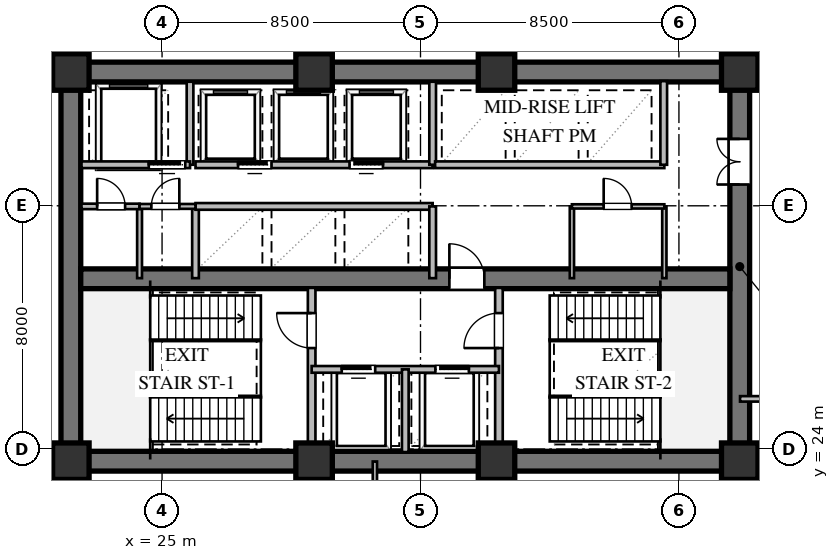
"""IFC4 building model, lengths in metres.
Left out: names, types, materials, properties, quantities, classifications, styles, units other than length and angle.
Written with IfcOpenShell. Run it as: python <this file> out.ifc"""

import sys

from ifc_helpers import new_model, si_unit, direction, frame, frame_2d, origin, origin_2d, place, context, subcontext, project, spatial, rectangle, extrude, element, fill, save


model = new_model("IFC4")
c1 = context("Model", 3, precision=1e-05, world=origin(), true_north=direction((0.0, 1.0)))
c2 = subcontext(c1, "Body", "Model", "MODEL_VIEW")
j1 = project(units=[si_unit("LENGTHUNIT", "METRE"), si_unit("PLANEANGLEUNIT", "RADIAN")], contexts=[c1])
p1 = place(None, origin())
s1 = spatial("IfcSite", under=j1, at=p1, CompositionType="ELEMENT")
p2 = place(p1, origin())
s2 = spatial("IfcBuilding", under=s1, at=p2, CompositionType="ELEMENT")
p3 = place(p2, frame((0.0, 0.0, 9.6)))
s3 = spatial("IfcBuildingStorey", under=s2, at=p3, CompositionType="ELEMENT", Elevation=9.6)
for number, where, z_axis, x_axis in (
    (1, (21.675, 23.6, 0.0), (0.0, 0.0, 1.0), (1.0, 0.0, 0.0)),
    (2, (21.675, 36.4, 0.0), (0.0, 0.0, 1.0), (1.0, 0.0, 0.0)),
):
    element("IfcWall", number, at=place(p3, frame(where, z_axis=z_axis, x_axis=x_axis)), inside=s3, PredefinedType="SHEAR", context=c2, shape_type="SweptSolid", body=[
        extrude(rectangle(XDim=22.65, YDim=0.65, at=frame_2d((11.325, 0.0))), origin(), (0.0, 0.0, 1.0), 4.52),
    ])
p4 = place(p3, frame((22.0, 23.925, 0.0), z_axis=(0.0, 0.0, 1.0), x_axis=(0.0, 1.0, 0.0)))
e3 = element("IfcWall", 3, at=p4, inside=s3, PredefinedType="SHEAR", context=c2, shape_type="SweptSolid", body=[
    extrude(rectangle(XDim=12.15, YDim=0.65, at=frame_2d((6.075, 0.0))), origin(), (0.0, 0.0, 1.0), 4.52),
])
p5 = place(p3, frame((44.0, 23.925, 0.0), z_axis=(0.0, 0.0, 1.0), x_axis=(0.0, 1.0, 0.0)))
e4 = element("IfcWall", 4, at=p5, inside=s3, PredefinedType="SHEAR", context=c2, shape_type="SweptSolid", body=[
    extrude(rectangle(XDim=12.15, YDim=0.65, at=frame_2d((6.075, 0.0))), origin(), (0.0, 0.0, 1.0), 4.52),
])
p6 = place(p5, frame((8.775, 0.0, 0.0)))
e5 = element("IfcOpeningElement", 5, at=p6, cuts=e4, PredefinedType="OPENING", context=c2, shape_type="SweptSolid", body=[
    extrude(rectangle(XDim=1.5, YDim=2.15, at=frame_2d((0.75, 1.075))), frame((0.0, 0.335, 0.0), z_axis=(0.0, -1.0, 0.0), x_axis=(1.0, 0.0, 0.0)), (0.0, 0.0, 1.0), 0.67),
])
p7 = place(p3, frame((22.325, 29.6, 0.0), z_axis=(0.0, 0.0, 1.0), x_axis=(1.0, 0.0, 0.0)))
e6 = element("IfcWall", 6, at=p7, inside=s3, PredefinedType="SHEAR", context=c2, shape_type="SweptSolid", body=[
    extrude(rectangle(XDim=21.35, YDim=0.65, at=frame_2d((10.675, 0.0))), origin(), (0.0, 0.0, 1.0), 4.52),
])
p8 = place(p7, frame((12.125, 0.0, 0.0)))
e7 = element("IfcOpeningElement", 7, at=p8, cuts=e6, PredefinedType="OPENING", context=c2, shape_type="SweptSolid", body=[
    extrude(rectangle(XDim=1.15, YDim=2.1, at=frame_2d((0.575, 1.05))), frame((0.0, 0.335, 0.0), z_axis=(0.0, -1.0, 0.0), x_axis=(1.0, 0.0, 0.0)), (0.0, 0.0, 1.0), 0.67),
])
for number, where, z_axis, x_axis in (
    (8, (22.0, 23.6, 0.0), (0.0, 0.0, 1.0), (1.0, 0.0, 0.0)),
    (9, (30.0, 23.6, 0.0), (0.0, 0.0, 1.0), (1.0, 0.0, 0.0)),
    (10, (36.0, 23.6, 0.0), (0.0, 0.0, 1.0), (1.0, 0.0, 0.0)),
    (11, (44.0, 23.6, 0.0), (0.0, 0.0, 1.0), (1.0, 0.0, 0.0)),
    (12, (44.0, 36.4, 0.0), (0.0, 0.0, 1.0), (1.0, 0.0, 0.0)),
    (13, (36.0, 36.4, 0.0), (0.0, 0.0, 1.0), (1.0, 0.0, 0.0)),
    (14, (30.0, 36.4, 0.0), (0.0, 0.0, 1.0), (1.0, 0.0, 0.0)),
    (15, (22.0, 36.4, 0.0), (0.0, 0.0, 1.0), (1.0, 0.0, 0.0)),
):
    element("IfcColumn", number, at=place(p3, frame(where, z_axis=z_axis, x_axis=x_axis)), inside=s3, PredefinedType="COLUMN", context=c2, shape_type="SweptSolid", body=[
        extrude(rectangle(XDim=1.2, YDim=1.2, at=origin_2d()), origin(), (0.0, 0.0, 1.0), 4.8),
    ])
p9 = place(p3, frame((29.92, 23.9, 0.0), z_axis=(0.0, 0.0, 1.0), x_axis=(0.0, 1.0, 0.0)))
e16 = element("IfcWall", 16, at=p9, inside=s3, PredefinedType="SOLIDWALL", context=c2, shape_type="SweptSolid", body=[
    extrude(rectangle(XDim=5.4, YDim=0.25, at=frame_2d((2.7, 0.0))), origin(), (0.0, 0.0, 1.0), 4.52),
])
p10 = place(p9, frame((3.421, 0.0, 0.0)))
e17 = element("IfcOpeningElement", 17, at=p10, cuts=e16, PredefinedType="OPENING", context=c2, shape_type="SweptSolid", body=[
    extrude(rectangle(XDim=1.15, YDim=2.1, at=frame_2d((0.575, 1.05))), frame((0.0, 0.135, 0.0), z_axis=(0.0, -1.0, 0.0), x_axis=(1.0, 0.0, 0.0)), (0.0, 0.0, 1.0), 0.27),
])
p11 = place(p3, frame((36.08, 23.9, 0.0), z_axis=(0.0, 0.0, 1.0), x_axis=(0.0, 1.0, 0.0)))
e18 = element("IfcWall", 18, at=p11, inside=s3, PredefinedType="SOLIDWALL", context=c2, shape_type="SweptSolid", body=[
    extrude(rectangle(XDim=5.4, YDim=0.25, at=frame_2d((2.7, 0.0))), origin(), (0.0, 0.0, 1.0), 4.52),
])
p12 = place(p11, frame((3.421, 0.0, 0.0)))
e19 = element("IfcOpeningElement", 19, at=p12, cuts=e18, PredefinedType="OPENING", context=c2, shape_type="SweptSolid", body=[
    extrude(rectangle(XDim=1.15, YDim=2.1, at=frame_2d((0.575, 1.05))), frame((0.0, 0.135, 0.0), z_axis=(0.0, -1.0, 0.0), x_axis=(1.0, 0.0, 0.0)), (0.0, 0.0, 1.0), 0.27),
])
p13 = place(p3, frame((29.92, 26.62, 0.0), z_axis=(0.0, 0.0, 1.0), x_axis=(1.0, 0.0, 0.0)))
e20 = element("IfcWall", 20, at=p13, inside=s3, PredefinedType="SOLIDWALL", context=c2, shape_type="SweptSolid", body=[
    extrude(rectangle(XDim=6.16, YDim=0.22, at=frame_2d((3.08, 0.0))), origin(), (0.0, 0.0, 1.0), 4.52),
])
p14 = place(p13, frame((0.99, 0.0, 0.0)))
e21 = element("IfcOpeningElement", 21, at=p14, cuts=e20, PredefinedType="OPENING", context=c2, shape_type="SweptSolid", body=[
    extrude(rectangle(XDim=1.1, YDim=2.1, at=frame_2d((0.55, 1.05))), frame((0.0, 0.12, 0.0), z_axis=(0.0, -1.0, 0.0), x_axis=(1.0, 0.0, 0.0)), (0.0, 0.0, 1.0), 0.24),
])
p15 = place(p13, frame((4.07, 0.0, 0.0)))
e22 = element("IfcOpeningElement", 22, at=p15, cuts=e20, PredefinedType="OPENING", context=c2, shape_type="SweptSolid", body=[
    extrude(rectangle(XDim=1.1, YDim=2.1, at=frame_2d((0.55, 1.05))), frame((0.0, 0.12, 0.0), z_axis=(0.0, -1.0, 0.0), x_axis=(1.0, 0.0, 0.0)), (0.0, 0.0, 1.0), 0.24),
])
p16 = place(p3, frame((33.0, 23.9, 0.0), z_axis=(0.0, 0.0, 1.0), x_axis=(0.0, 1.0, 0.0)))
e23 = element("IfcWall", 23, at=p16, inside=s3, PredefinedType="SOLIDWALL", context=c2, shape_type="SweptSolid", body=[
    extrude(rectangle(XDim=2.72, YDim=0.22, at=frame_2d((1.36, 0.0))), origin(), (0.0, 0.0, 1.0), 4.52),
])
p17 = place(p3, frame((25.92, 33.35, 0.0), z_axis=(0.0, 0.0, 1.0), x_axis=(0.0, 1.0, 0.0)))
e24 = element("IfcWall", 24, at=p17, inside=s3, PredefinedType="SOLIDWALL", context=c2, shape_type="SweptSolid", body=[
    extrude(rectangle(XDim=2.73, YDim=0.22, at=frame_2d((1.365, 0.0))), origin(), (0.0, 0.0, 1.0), 4.52),
])
p18 = place(p3, frame((22.35, 33.35, 0.0), z_axis=(0.0, 0.0, 1.0), x_axis=(1.0, 0.0, 0.0)))
e25 = element("IfcWall", 25, at=p18, inside=s3, PredefinedType="SOLIDWALL", context=c2, shape_type="SweptSolid", body=[
    extrude(rectangle(XDim=3.57, YDim=0.22, at=frame_2d((1.785, 0.0))), origin(), (0.0, 0.0, 1.0), 4.52),
])
p19 = place(p18, frame((2.213, 0.0, 0.0)))
e26 = element("IfcOpeningElement", 26, at=p19, cuts=e25, PredefinedType="OPENING", context=c2, shape_type="SweptSolid", body=[
    extrude(rectangle(XDim=1.2, YDim=2.1, at=frame_2d((0.6, 1.05))), frame((0.0, 0.12, 0.0), z_axis=(0.0, -1.0, 0.0), x_axis=(1.0, 0.0, 0.0)), (0.0, 0.0, 1.0), 0.24),
])
p20 = place(p3, frame((26.1, 29.62, 0.0), z_axis=(0.0, 0.0, 1.0), x_axis=(0.0, 1.0, 0.0)))
e27 = element("IfcWall", 27, at=p20, inside=s3, PredefinedType="SOLIDWALL", context=c2, shape_type="SweptSolid", body=[
    extrude(rectangle(XDim=2.36, YDim=0.22, at=frame_2d((1.18, 0.0))), origin(), (0.0, 0.0, 1.0), 4.52),
])
p21 = place(p3, frame((26.1, 31.98, 0.0), z_axis=(0.0, 0.0, 1.0), x_axis=(1.0, 0.0, 0.0)))
e28 = element("IfcWall", 28, at=p21, inside=s3, PredefinedType="SOLIDWALL", context=c2, shape_type="SweptSolid", body=[
    extrude(rectangle(XDim=7.8, YDim=0.22, at=frame_2d((3.9, 0.0))), origin(), (0.0, 0.0, 1.0), 4.52),
])
p22 = place(p3, frame((33.9, 29.62, 0.0), z_axis=(0.0, 0.0, 1.0), x_axis=(0.0, 1.0, 0.0)))
e29 = element("IfcWall", 29, at=p22, inside=s3, PredefinedType="SOLIDWALL", context=c2, shape_type="SweptSolid", body=[
    extrude(rectangle(XDim=2.36, YDim=0.22, at=frame_2d((1.18, 0.0))), origin(), (0.0, 0.0, 1.0), 4.52),
])
p23 = place(p3, frame((26.1, 33.35, 0.0), z_axis=(0.0, 0.0, 1.0), x_axis=(1.0, 0.0, 0.0)))
e30 = element("IfcWall", 30, at=p23, inside=s3, PredefinedType="SOLIDWALL", context=c2, shape_type="SweptSolid", body=[
    extrude(rectangle(XDim=7.8, YDim=0.22, at=frame_2d((3.9, 0.0))), origin(), (0.0, 0.0, 1.0), 4.52),
])
p24 = place(p23, frame((1.4, 0.0, 0.0)))
e31 = element("IfcOpeningElement", 31, at=p24, cuts=e30, PredefinedType="OPENING", context=c2, shape_type="SweptSolid", body=[
    extrude(rectangle(XDim=1.1, YDim=2.1, at=frame_2d((0.55, 1.05))), frame((0.0, 0.12, 0.0), z_axis=(0.0, -1.0, 0.0), x_axis=(1.0, 0.0, 0.0)), (0.0, 0.0, 1.0), 0.24),
])
p25 = place(p23, frame((5.066, 0.0, 0.0)))
e32 = element("IfcOpeningElement", 32, at=p25, cuts=e30, PredefinedType="OPENING", context=c2, shape_type="SweptSolid", body=[
    extrude(rectangle(XDim=1.1, YDim=2.1, at=frame_2d((0.55, 1.05))), frame((0.0, 0.12, 0.0), z_axis=(0.0, -1.0, 0.0), x_axis=(1.0, 0.0, 0.0)), (0.0, 0.0, 1.0), 0.24),
])
p26 = place(p3, frame((33.9, 33.35, 0.0), z_axis=(0.0, 0.0, 1.0), x_axis=(0.0, 1.0, 0.0)))
e33 = element("IfcWall", 33, at=p26, inside=s3, PredefinedType="SOLIDWALL", context=c2, shape_type="SweptSolid", body=[
    extrude(rectangle(XDim=2.73, YDim=0.22, at=frame_2d((1.365, 0.0))), origin(), (0.0, 0.0, 1.0), 4.52),
])
p27 = place(p3, frame((33.98, 33.35, 0.0), z_axis=(0.0, 0.0, 1.0), x_axis=(1.0, 0.0, 0.0)))
e34 = element("IfcWall", 34, at=p27, inside=s3, PredefinedType="SOLIDWALL", context=c2, shape_type="SweptSolid", body=[
    extrude(rectangle(XDim=7.54, YDim=0.22, at=frame_2d((3.77, 0.0))), origin(), (0.0, 0.0, 1.0), 4.52),
])
p28 = place(p3, frame((41.5, 33.35, 0.0), z_axis=(0.0, 0.0, 1.0), x_axis=(0.0, 1.0, 0.0)))
e35 = element("IfcWall", 35, at=p28, inside=s3, PredefinedType="SOLIDWALL", context=c2, shape_type="SweptSolid", body=[
    extrude(rectangle(XDim=2.75, YDim=0.22, at=frame_2d((1.375, 0.0))), origin(), (0.0, 0.0, 1.0), 4.52),
])
p29 = place(p3, frame((24.26, 29.62, 0.0), z_axis=(0.0, 0.0, 1.0), x_axis=(0.0, 1.0, 0.0)))
e36 = element("IfcWall", 36, at=p29, inside=s3, PredefinedType="PLUMBINGWALL", context=c2, shape_type="SweptSolid", body=[
    extrude(rectangle(XDim=2.36, YDim=0.16, at=frame_2d((1.18, 0.0))), origin(), (0.0, 0.0, 1.0), 1.887),
])
p30 = place(p3, frame((22.35, 31.98, 0.0), z_axis=(0.0, 0.0, 1.0), x_axis=(1.0, 0.0, 0.0)))
e37 = element("IfcWall", 37, at=p30, inside=s3, PredefinedType="PARTITIONING", context=c2, shape_type="SweptSolid", body=[
    extrude(rectangle(XDim=1.91, YDim=0.18, at=frame_2d((0.955, 0.0))), origin(), (0.0, 0.0, 1.0), 4.52),
])
p31 = place(p30, frame((0.515, 0.0, 0.0)))
e38 = element("IfcOpeningElement", 38, at=p31, cuts=e37, PredefinedType="OPENING", context=c2, shape_type="SweptSolid", body=[
    extrude(rectangle(XDim=0.92, YDim=2.1, at=frame_2d((0.46, 1.05))), frame((0.0, 0.1, 0.0), z_axis=(0.0, -1.0, 0.0), x_axis=(1.0, 0.0, 0.0)), (0.0, 0.0, 1.0), 0.2),
])
p32 = place(p3, frame((24.26, 31.98, 0.0), z_axis=(0.0, 0.0, 1.0), x_axis=(1.0, 0.0, 0.0)))
e39 = element("IfcWall", 39, at=p32, inside=s3, PredefinedType="PLUMBINGWALL", context=c2, shape_type="SweptSolid", body=[
    extrude(rectangle(XDim=1.84, YDim=0.16, at=frame_2d((0.92, 0.0))), origin(), (0.0, 0.0, 1.0), 4.52),
])
p33 = place(p32, frame((0.388, 0.0, 0.0)))
e40 = element("IfcOpeningElement", 40, at=p33, cuts=e39, PredefinedType="OPENING", context=c2, shape_type="SweptSolid", body=[
    extrude(rectangle(XDim=0.92, YDim=2.1, at=frame_2d((0.46, 1.05))), frame((0.0, 0.09, 0.0), z_axis=(0.0, -1.0, 0.0), x_axis=(1.0, 0.0, 0.0)), (0.0, 0.0, 1.0), 0.18),
])
p34 = place(p3, frame((38.48, 29.62, 0.0), z_axis=(0.0, 0.0, 1.0), x_axis=(0.0, 1.0, 0.0)))
e41 = element("IfcWall", 41, at=p34, inside=s3, PredefinedType="PARTITIONING", context=c2, shape_type="SweptSolid", body=[
    extrude(rectangle(XDim=2.36, YDim=0.14, at=frame_2d((1.18, 0.0))), origin(), (0.0, 0.0, 1.0), 4.52),
])
p35 = place(p3, frame((41.52, 29.62, 0.0), z_axis=(0.0, 0.0, 1.0), x_axis=(0.0, 1.0, 0.0)))
e42 = element("IfcWall", 42, at=p35, inside=s3, PredefinedType="PARTITIONING", context=c2, shape_type="SweptSolid", body=[
    extrude(rectangle(XDim=2.36, YDim=0.14, at=frame_2d((1.18, 0.0))), origin(), (0.0, 0.0, 1.0), 1.887),
])
p36 = place(p3, frame((38.48, 31.98, 0.0), z_axis=(0.0, 0.0, 1.0), x_axis=(1.0, 0.0, 0.0)))
e43 = element("IfcWall", 43, at=p36, inside=s3, PredefinedType="PARTITIONING", context=c2, shape_type="SweptSolid", body=[
    extrude(rectangle(XDim=3.04, YDim=0.14, at=frame_2d((1.52, 0.0))), origin(), (0.0, 0.0, 1.0), 4.52),
])
p37 = place(p36, frame((1.045, 0.0, 0.0)))
e44 = element("IfcOpeningElement", 44, at=p37, cuts=e43, PredefinedType="OPENING", context=c2, shape_type="SweptSolid", body=[
    extrude(rectangle(XDim=0.92, YDim=2.1, at=frame_2d((0.46, 1.05))), frame((0.0, 0.08, 0.0), z_axis=(0.0, -1.0, 0.0), x_axis=(1.0, 0.0, 0.0)), (0.0, 0.0, 1.0), 0.16),
])
p38 = place(p3, frame((62.415, 25.65, 0.0), z_axis=(0.0, 0.0, 1.0), x_axis=(-1.0, 0.0, 0.0)))
e45 = element("IfcWall", 45, at=p38, inside=s3, PredefinedType="PARTITIONING", context=c2, shape_type="SweptSolid", body=[
    extrude(rectangle(XDim=18.405, YDim=0.18, at=frame_2d((9.203, 0.0))), origin(), (0.0, 0.0, 1.0), 3.966),
])
p39 = place(p38, frame((8.46, 0.0, 0.0)))
e46 = element("IfcOpeningElement", 46, at=p39, cuts=e45, PredefinedType="OPENING", context=c2, shape_type="SweptSolid", body=[
    extrude(rectangle(XDim=1.2, YDim=2.15, at=frame_2d((0.6, 1.075))), frame((0.0, 0.1, 0.0), z_axis=(0.0, -1.0, 0.0), x_axis=(1.0, 0.0, 0.0)), (0.0, 0.0, 1.0), 0.2),
])
p40 = place(p3, frame((21.675, 23.59, 0.0), z_axis=(0.0, 0.0, 1.0), x_axis=(0.0, -1.0, 0.0)))
e47 = element("IfcWall", 47, at=p40, inside=s3, PredefinedType="PARTITIONING", context=c2, shape_type="SweptSolid", body=[
    extrude(rectangle(XDim=3.62, YDim=0.18, at=frame_2d((1.81, 0.0))), origin(), (0.0, 0.0, 1.0), 3.66),
])
p41 = place(p3, frame((44.325, 5.272, 0.0), z_axis=(0.0, 0.0, 1.0), x_axis=(0.0, 1.0, 0.0)))
e48 = element("IfcWall", 48, at=p41, inside=s3, PredefinedType="PARTITIONING", context=c2, shape_type="SweptSolid", body=[
    extrude(rectangle(XDim=18.318, YDim=0.14, at=frame_2d((9.159, 0.0))), origin(), (0.0, 0.0, 1.0), 3.66),
])
p42 = place(p41, frame((8.349, 0.0, 0.0)))
e49 = element("IfcOpeningElement", 49, at=p42, cuts=e48, PredefinedType="OPENING", context=c2, shape_type="SweptSolid", body=[
    extrude(rectangle(XDim=1.2, YDim=2.15, at=frame_2d((0.6, 1.075))), frame((0.0, 0.08, 0.0), z_axis=(0.0, -1.0, 0.0), x_axis=(1.0, 0.0, 0.0)), (0.0, 0.0, 1.0), 0.16),
])
p43 = place(p3, frame((32.0, 23.59, 0.0), z_axis=(0.0, 0.0, 1.0), x_axis=(0.0, -1.0, 0.0)))
e50 = element("IfcWall", 50, at=p43, inside=s3, PredefinedType="PARTITIONING", context=c2, shape_type="SweptSolid", body=[
    extrude(rectangle(XDim=16.944, YDim=0.14, at=frame_2d((8.472, 0.0))), origin(), (0.0, 0.0, 1.0), 4.52),
])
p44 = place(p10, origin())
e51 = element("IfcDoor", 51, at=p44, inside=s3, OperationType="SINGLE_SWING_RIGHT", PredefinedType="DOOR", context=c2, shape_type="SweptSolid", body=[
    extrude(rectangle(XDim=1.15, YDim=2.1, at=frame_2d((0.575, 1.05))), frame((0.0, 0.025, 0.0), z_axis=(0.0, -1.0, 0.0), x_axis=(1.0, 0.0, 0.0)), (0.0, 0.0, 1.0), 0.05),
])
fill(e17, e51)
p45 = place(p12, origin())
e52 = element("IfcDoor", 52, at=p45, inside=s3, OperationType="SINGLE_SWING_LEFT", PredefinedType="DOOR", context=c2, shape_type="SweptSolid", body=[
    extrude(rectangle(XDim=1.15, YDim=2.1, at=frame_2d((0.575, 1.05))), frame((0.0, 0.025, 0.0), z_axis=(0.0, -1.0, 0.0), x_axis=(1.0, 0.0, 0.0)), (0.0, 0.0, 1.0), 0.05),
])
fill(e19, e52)
p46 = place(p14, origin())
e53 = element("IfcDoor", 53, at=p46, inside=s3, OperationType="SLIDING_TO_LEFT", PredefinedType="DOOR", context=c2, shape_type="SweptSolid", body=[
    extrude(rectangle(XDim=1.1, YDim=2.1, at=frame_2d((0.55, 1.05))), frame((0.0, 0.025, 0.0), z_axis=(0.0, -1.0, 0.0), x_axis=(1.0, 0.0, 0.0)), (0.0, 0.0, 1.0), 0.05),
])
fill(e21, e53)
p47 = place(p15, origin())
e54 = element("IfcDoor", 54, at=p47, inside=s3, OperationType="SLIDING_TO_RIGHT", PredefinedType="DOOR", context=c2, shape_type="SweptSolid", body=[
    extrude(rectangle(XDim=1.1, YDim=2.1, at=frame_2d((0.55, 1.05))), frame((0.0, 0.025, 0.0), z_axis=(0.0, -1.0, 0.0), x_axis=(1.0, 0.0, 0.0)), (0.0, 0.0, 1.0), 0.05),
])
fill(e22, e54)
p48 = place(p8, origin())
e55 = element("IfcDoor", 55, at=p48, inside=s3, OperationType="SINGLE_SWING_LEFT", PredefinedType="DOOR", context=c2, shape_type="SweptSolid", body=[
    extrude(rectangle(XDim=1.15, YDim=2.1, at=frame_2d((0.575, 1.05))), frame((0.0, 0.025, 0.0), z_axis=(0.0, -1.0, 0.0), x_axis=(1.0, 0.0, 0.0)), (0.0, 0.0, 1.0), 0.05),
])
fill(e7, e55)
p49 = place(p6, origin())
e56 = element("IfcDoor", 56, at=p49, inside=s3, OperationType="DOUBLE_DOOR_SINGLE_SWING", PredefinedType="DOOR", context=c2, shape_type="SweptSolid", body=[
    extrude(rectangle(XDim=1.5, YDim=2.15, at=frame_2d((0.75, 1.075))), frame((0.0, 0.025, 0.0), z_axis=(0.0, -1.0, 0.0), x_axis=(1.0, 0.0, 0.0)), (0.0, 0.0, 1.0), 0.05),
])
fill(e5, e56)
p50 = place(p19, origin())
e57 = element("IfcDoor", 57, at=p50, inside=s3, OperationType="SLIDING_TO_LEFT", PredefinedType="DOOR", context=c2, shape_type="SweptSolid", body=[
    extrude(rectangle(XDim=1.2, YDim=2.1, at=frame_2d((0.6, 1.05))), frame((0.0, 0.025, 0.0), z_axis=(0.0, -1.0, 0.0), x_axis=(1.0, 0.0, 0.0)), (0.0, 0.0, 1.0), 0.05),
])
fill(e26, e57)
p51 = place(p24, origin())
e58 = element("IfcDoor", 58, at=p51, inside=s3, OperationType="SLIDING_TO_LEFT", PredefinedType="DOOR", context=c2, shape_type="SweptSolid", body=[
    extrude(rectangle(XDim=1.1, YDim=2.1, at=frame_2d((0.55, 1.05))), frame((0.0, 0.025, 0.0), z_axis=(0.0, -1.0, 0.0), x_axis=(1.0, 0.0, 0.0)), (0.0, 0.0, 1.0), 0.05),
])
fill(e31, e58)
p52 = place(p25, origin())
e59 = element("IfcDoor", 59, at=p52, inside=s3, OperationType="SLIDING_TO_RIGHT", PredefinedType="DOOR", context=c2, shape_type="SweptSolid", body=[
    extrude(rectangle(XDim=1.1, YDim=2.1, at=frame_2d((0.55, 1.05))), frame((0.0, 0.025, 0.0), z_axis=(0.0, -1.0, 0.0), x_axis=(1.0, 0.0, 0.0)), (0.0, 0.0, 1.0), 0.05),
])
fill(e32, e59)
p53 = place(p31, origin())
e60 = element("IfcDoor", 60, at=p53, inside=s3, OperationType="SINGLE_SWING_LEFT", PredefinedType="DOOR", context=c2, shape_type="SweptSolid", body=[
    extrude(rectangle(XDim=0.92, YDim=2.1, at=frame_2d((0.46, 1.05))), frame((0.0, 0.025, 0.0), z_axis=(0.0, -1.0, 0.0), x_axis=(1.0, 0.0, 0.0)), (0.0, 0.0, 1.0), 0.05),
])
fill(e38, e60)
p54 = place(p33, origin())
e61 = element("IfcDoor", 61, at=p54, inside=s3, OperationType="SINGLE_SWING_RIGHT", PredefinedType="DOOR", context=c2, shape_type="SweptSolid", body=[
    extrude(rectangle(XDim=0.92, YDim=2.1, at=frame_2d((0.46, 1.05))), frame((0.0, 0.025, 0.0), z_axis=(0.0, -1.0, 0.0), x_axis=(1.0, 0.0, 0.0)), (0.0, 0.0, 1.0), 0.05),
])
fill(e40, e61)
p55 = place(p37, origin())
e62 = element("IfcDoor", 62, at=p55, inside=s3, OperationType="SINGLE_SWING_LEFT", PredefinedType="DOOR", context=c2, shape_type="SweptSolid", body=[
    extrude(rectangle(XDim=0.92, YDim=2.1, at=frame_2d((0.46, 1.05))), frame((0.0, 0.025, 0.0), z_axis=(0.0, -1.0, 0.0), x_axis=(1.0, 0.0, 0.0)), (0.0, 0.0, 1.0), 0.05),
])
fill(e44, e62)
save(model, sys.argv[1])
